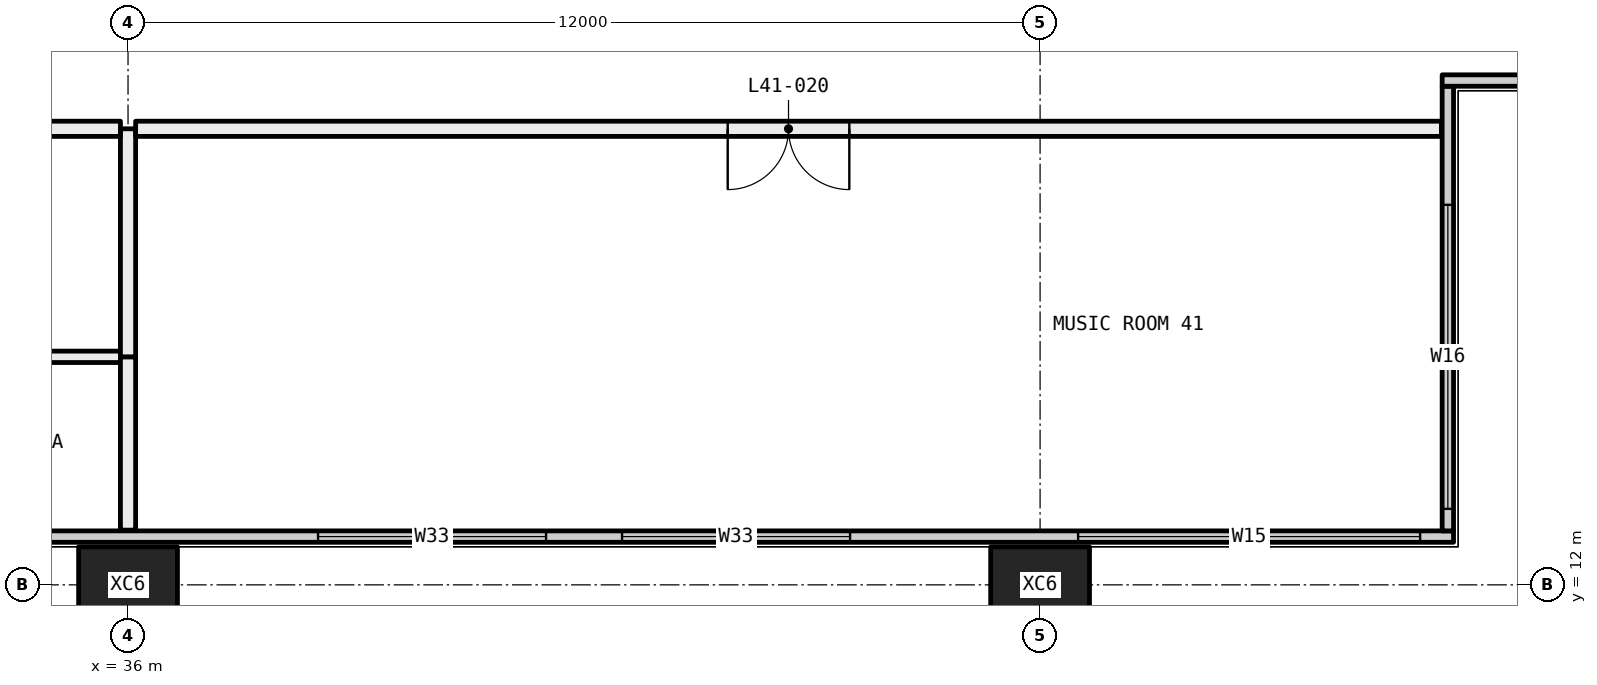
"""IFC4 building model, lengths in metres.
Left out: names, types, materials, properties, quantities, classifications, styles, units other than length and angle.
Written with IfcOpenShell. Run it as: python <this file> out.ifc"""

import sys

from ifc_helpers import new_model, si_unit, direction, frame, frame_2d, origin, origin_2d, place, context, subcontext, project, spatial, rectangle, hollow_rectangle, extrude, element, fill, save


model = new_model("IFC4")
c1 = context("Model", 3, precision=1e-05, world=origin(), true_north=direction((0.0, 1.0)))
c2 = subcontext(c1, "Body", "Model", "MODEL_VIEW")
j1 = project(units=[si_unit("LENGTHUNIT", "METRE"), si_unit("PLANEANGLEUNIT", "RADIAN")], contexts=[c1])
p1 = place(None, origin())
s1 = spatial("IfcSite", under=j1, at=p1, CompositionType="ELEMENT")
p2 = place(p1, origin())
s2 = spatial("IfcBuilding", under=s1, at=p2, CompositionType="ELEMENT")
p3 = place(p2, frame((0.0, 0.0, 158.25)))
s3 = spatial("IfcBuildingStorey", under=s2, at=p3, CompositionType="ELEMENT", Elevation=158.25)
for number, where, z_axis, x_axis in (
    (1, (36.0, 12.0, -0.4), (0.0, 0.0, 1.0), (1.0, 0.0, 0.0)),
    (2, (48.0, 12.0, -0.4), (0.0, 0.0, 1.0), (1.0, 0.0, 0.0)),
):
    element("IfcColumn", number, at=place(p3, frame(where, z_axis=z_axis, x_axis=x_axis)), inside=s3, PredefinedType="COLUMN", context=c2, shape_type="SweptSolid", body=[
        extrude(hollow_rectangle(XDim=1.3, YDim=1.0, WallThickness=0.05, at=origin_2d()), origin(), (0.0, 0.0, 1.0), 3.45),
    ])
p4 = place(p3, frame((6.56, 12.635, 0.0), z_axis=(0.0, 0.0, 1.0), x_axis=(1.0, 0.0, 0.0)))
e3 = element("IfcWall", 3, at=p4, inside=s3, PredefinedType="ELEMENTEDWALL", context=c2, shape_type="SweptSolid", body=[
    extrude(rectangle(XDim=46.88, YDim=0.15, at=frame_2d((23.44, 0.0))), origin(), (0.0, 0.0, 1.0), 3.05),
])
p5 = place(p4, frame((0.44, 0.0, 0.45)))
e4 = element("IfcOpeningElement", 4, at=p5, cuts=e3, PredefinedType="OPENING", context=c2, shape_type="SweptSolid", body=[
    extrude(rectangle(XDim=4.5, YDim=2.55, at=frame_2d((2.25, 1.275))), frame((0.0, 0.085, 0.0), z_axis=(0.0, -1.0, 0.0), x_axis=(1.0, 0.0, 0.0)), (0.0, 0.0, 1.0), 0.17),
])
p6 = place(p4, frame((7.94, 0.0, 0.45)))
e5 = element("IfcOpeningElement", 5, at=p6, cuts=e3, PredefinedType="OPENING", context=c2, shape_type="SweptSolid", body=[
    extrude(rectangle(XDim=3.0, YDim=2.55, at=frame_2d((1.5, 1.275))), frame((0.0, 0.085, 0.0), z_axis=(0.0, -1.0, 0.0), x_axis=(1.0, 0.0, 0.0)), (0.0, 0.0, 1.0), 0.17),
])
p7 = place(p4, frame((11.94, 0.0, 0.45)))
e6 = element("IfcOpeningElement", 6, at=p7, cuts=e3, PredefinedType="OPENING", context=c2, shape_type="SweptSolid", body=[
    extrude(rectangle(XDim=3.0, YDim=2.55, at=frame_2d((1.5, 1.275))), frame((0.0, 0.085, 0.0), z_axis=(0.0, -1.0, 0.0), x_axis=(1.0, 0.0, 0.0)), (0.0, 0.0, 1.0), 0.17),
])
p8 = place(p4, frame((19.94, 0.0, 0.45)))
e7 = element("IfcOpeningElement", 7, at=p8, cuts=e3, PredefinedType="OPENING", context=c2, shape_type="SweptSolid", body=[
    extrude(rectangle(XDim=3.0, YDim=2.55, at=frame_2d((1.5, 1.275))), frame((0.0, 0.085, 0.0), z_axis=(0.0, -1.0, 0.0), x_axis=(1.0, 0.0, 0.0)), (0.0, 0.0, 1.0), 0.17),
])
p9 = place(p4, frame((23.94, 0.0, 0.45)))
e8 = element("IfcOpeningElement", 8, at=p9, cuts=e3, PredefinedType="OPENING", context=c2, shape_type="SweptSolid", body=[
    extrude(rectangle(XDim=2.0, YDim=2.55, at=frame_2d((1.0, 1.275))), frame((0.0, 0.085, 0.0), z_axis=(0.0, -1.0, 0.0), x_axis=(1.0, 0.0, 0.0)), (0.0, 0.0, 1.0), 0.17),
])
p10 = place(p4, frame((31.94, 0.0, 0.45)))
e9 = element("IfcOpeningElement", 9, at=p10, cuts=e3, PredefinedType="OPENING", context=c2, shape_type="SweptSolid", body=[
    extrude(rectangle(XDim=3.0, YDim=2.55, at=frame_2d((1.5, 1.275))), frame((0.0, 0.085, 0.0), z_axis=(0.0, -1.0, 0.0), x_axis=(1.0, 0.0, 0.0)), (0.0, 0.0, 1.0), 0.17),
])
p11 = place(p4, frame((35.94, 0.0, 0.45)))
e10 = element("IfcOpeningElement", 10, at=p11, cuts=e3, PredefinedType="OPENING", context=c2, shape_type="SweptSolid", body=[
    extrude(rectangle(XDim=3.0, YDim=2.55, at=frame_2d((1.5, 1.275))), frame((0.0, 0.085, 0.0), z_axis=(0.0, -1.0, 0.0), x_axis=(1.0, 0.0, 0.0)), (0.0, 0.0, 1.0), 0.17),
])
p12 = place(p4, frame((41.94, 0.0, 0.45)))
e11 = element("IfcOpeningElement", 11, at=p12, cuts=e3, PredefinedType="OPENING", context=c2, shape_type="SweptSolid", body=[
    extrude(rectangle(XDim=4.5, YDim=2.55, at=frame_2d((2.25, 1.275))), frame((0.0, 0.085, 0.0), z_axis=(0.0, -1.0, 0.0), x_axis=(1.0, 0.0, 0.0)), (0.0, 0.0, 1.0), 0.17),
])
p13 = place(p3, frame((53.365, 12.71, 0.0), z_axis=(0.0, 0.0, 1.0), x_axis=(0.0, 1.0, 0.0)))
e12 = element("IfcWall", 12, at=p13, inside=s3, PredefinedType="ELEMENTEDWALL", context=c2, shape_type="SweptSolid", body=[
    extrude(rectangle(XDim=5.85, YDim=0.15, at=frame_2d((2.925, 0.0))), origin(), (0.0, 0.0, 1.0), 3.05),
])
p14 = place(p13, frame((0.29, 0.0, 0.45)))
e13 = element("IfcOpeningElement", 13, at=p14, cuts=e12, PredefinedType="OPENING", context=c2, shape_type="SweptSolid", body=[
    extrude(rectangle(XDim=4.0, YDim=2.55, at=frame_2d((2.0, 1.275))), frame((0.0, 0.085, 0.0), z_axis=(0.0, -1.0, 0.0), x_axis=(1.0, 0.0, 0.0)), (0.0, 0.0, 1.0), 0.17),
])
p15 = place(p3, frame((53.29, 18.635, 0.0), z_axis=(0.0, 0.0, 1.0), x_axis=(1.0, 0.0, 0.0)))
e14 = element("IfcWall", 14, at=p15, inside=s3, PredefinedType="ELEMENTEDWALL", context=c2, shape_type="SweptSolid", body=[
    extrude(rectangle(XDim=6.15, YDim=0.15, at=frame_2d((3.075, 0.0))), origin(), (0.0, 0.0, 1.0), 3.05),
])
p16 = place(p15, frame((1.71, 0.0, 0.45)))
e15 = element("IfcOpeningElement", 15, at=p16, cuts=e14, PredefinedType="OPENING", context=c2, shape_type="SweptSolid", body=[
    extrude(rectangle(XDim=4.0, YDim=2.55, at=frame_2d((2.0, 1.275))), frame((0.0, 0.085, 0.0), z_axis=(0.0, -1.0, 0.0), x_axis=(1.0, 0.0, 0.0)), (0.0, 0.0, 1.0), 0.17),
])
p17 = place(p3, frame((35.9, 15.0, 0.0), z_axis=(0.0, 0.0, 1.0), x_axis=(-1.0, 0.0, 0.0)))
e16 = element("IfcWall", 16, at=p17, inside=s3, PredefinedType="PARTITIONING", context=c2, shape_type="SweptSolid", body=[
    extrude(rectangle(XDim=5.825, YDim=0.15, at=frame_2d((2.913, 0.0))), origin(), (0.0, 0.0, 1.0), 3.05),
])
p18 = place(p3, frame((36.0, 12.72, 0.0), z_axis=(0.0, 0.0, 1.0), x_axis=(0.0, 1.0, 0.0)))
e17 = element("IfcWall", 17, at=p18, inside=s3, PredefinedType="PARTITIONING", context=c2, shape_type="SweptSolid", body=[
    extrude(rectangle(XDim=2.28, YDim=0.2, at=frame_2d((1.14, 0.0))), origin(), (0.0, 0.0, 1.0), 2.45),
])
p19 = place(p3, frame((36.0, 15.0, 0.0), z_axis=(0.0, 0.0, 1.0), x_axis=(0.0, 1.0, 0.0)))
e18 = element("IfcWall", 18, at=p19, inside=s3, PredefinedType="PARTITIONING", context=c2, shape_type="SweptSolid", body=[
    extrude(rectangle(XDim=3.0, YDim=0.2, at=frame_2d((1.5, 0.0))), origin(), (0.0, 0.0, 1.0), 2.45),
])
p20 = place(p3, frame((35.9, 18.0, 0.0), z_axis=(0.0, 0.0, 1.0), x_axis=(-1.0, 0.0, 0.0)))
e19 = element("IfcWall", 19, at=p20, inside=s3, PredefinedType="PARTITIONING", context=c2, shape_type="SweptSolid", body=[
    extrude(rectangle(XDim=5.9, YDim=0.2, at=frame_2d((2.95, 0.0))), origin(), (0.0, 0.0, 1.0), 3.05),
])
p21 = place(p3, frame((53.28, 18.0, 0.0), z_axis=(0.0, 0.0, 1.0), x_axis=(-1.0, 0.0, 0.0)))
e20 = element("IfcWall", 20, at=p21, inside=s3, PredefinedType="PARTITIONING", context=c2, shape_type="SweptSolid", body=[
    extrude(rectangle(XDim=17.18, YDim=0.2, at=frame_2d((8.59, 0.0))), origin(), (0.0, 0.0, 1.0), 3.05),
])
p22 = place(p21, frame((7.79, 0.0, 0.0)))
e21 = element("IfcOpeningElement", 21, at=p22, cuts=e20, PredefinedType="OPENING", context=c2, shape_type="SweptSolid", body=[
    extrude(rectangle(XDim=1.6, YDim=2.1, at=frame_2d((0.8, 1.05))), frame((0.0, 0.11, 0.0), z_axis=(0.0, -1.0, 0.0), x_axis=(1.0, 0.0, 0.0)), (0.0, 0.0, 1.0), 0.22),
])
p23 = place(p10, origin())
e22 = element("IfcWindow", 22, at=p23, inside=s3, PartitioningType="SINGLE_PANEL", PredefinedType="WINDOW", context=c2, shape_type="SweptSolid", body=[
    extrude(rectangle(XDim=3.0, YDim=2.55, at=frame_2d((1.5, 1.275))), frame((0.0, 0.03, 0.0), z_axis=(0.0, -1.0, 0.0), x_axis=(1.0, 0.0, 0.0)), (0.0, 0.0, 1.0), 0.06),
])
fill(e9, e22)
p24 = place(p11, origin())
e23 = element("IfcWindow", 23, at=p24, inside=s3, PartitioningType="SINGLE_PANEL", PredefinedType="WINDOW", context=c2, shape_type="SweptSolid", body=[
    extrude(rectangle(XDim=3.0, YDim=2.55, at=frame_2d((1.5, 1.275))), frame((0.0, 0.03, 0.0), z_axis=(0.0, -1.0, 0.0), x_axis=(1.0, 0.0, 0.0)), (0.0, 0.0, 1.0), 0.06),
])
fill(e10, e23)
p25 = place(p12, origin())
e24 = element("IfcWindow", 24, at=p25, inside=s3, PartitioningType="SINGLE_PANEL", PredefinedType="WINDOW", context=c2, shape_type="SweptSolid", body=[
    extrude(rectangle(XDim=4.5, YDim=2.55, at=frame_2d((2.25, 1.275))), frame((0.0, 0.03, 0.0), z_axis=(0.0, -1.0, 0.0), x_axis=(1.0, 0.0, 0.0)), (0.0, 0.0, 1.0), 0.06),
])
fill(e11, e24)
p26 = place(p14, origin())
e25 = element("IfcWindow", 25, at=p26, inside=s3, PartitioningType="SINGLE_PANEL", PredefinedType="WINDOW", context=c2, shape_type="SweptSolid", body=[
    extrude(rectangle(XDim=4.0, YDim=2.55, at=frame_2d((2.0, 1.275))), frame((0.0, 0.03, 0.0), z_axis=(0.0, -1.0, 0.0), x_axis=(1.0, 0.0, 0.0)), (0.0, 0.0, 1.0), 0.06),
])
fill(e13, e25)
p27 = place(p22, origin())
e26 = element("IfcDoor", 26, at=p27, inside=s3, OperationType="DOUBLE_DOOR_SINGLE_SWING", PredefinedType="DOOR", context=c2, shape_type="SweptSolid", body=[
    extrude(rectangle(XDim=1.6, YDim=2.1, at=frame_2d((0.8, 1.05))), frame((0.0, 0.025, 0.0), z_axis=(0.0, -1.0, 0.0), x_axis=(1.0, 0.0, 0.0)), (0.0, 0.0, 1.0), 0.05),
])
fill(e21, e26)
save(model, sys.argv[1])
